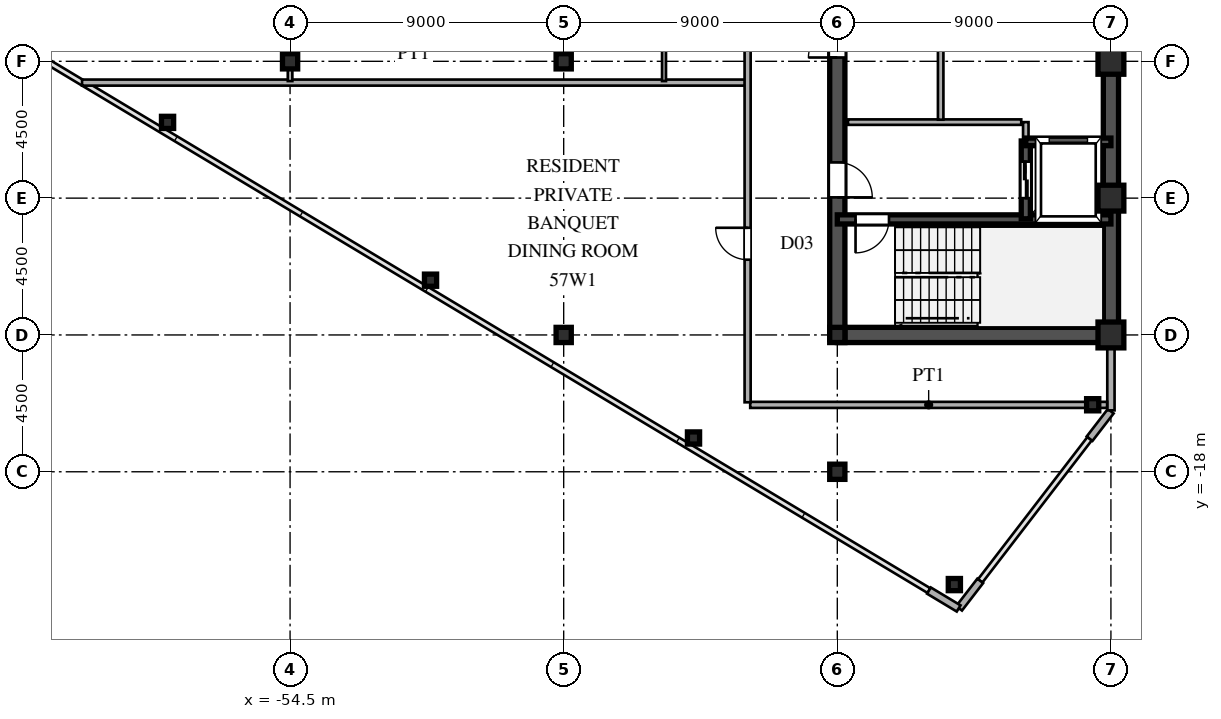
"""IFC4 building model, lengths in metres.
Left out: names, types, materials, properties, quantities, classifications, styles, units other than length and angle.
Written with IfcOpenShell. Run it as: python <this file> out.ifc"""

import sys

from ifc_helpers import new_model, si_unit, direction, frame, frame_2d, origin, origin_2d, place, context, subcontext, project, spatial, rectangle, hollow_rectangle, i_section, extrude, source, transform, mapped, element, fill, save


model = new_model("IFC4")
c1 = context("Model", 3, precision=1e-05, world=origin(), true_north=direction((0.0, 1.0)))
c2 = subcontext(c1, "Body", "Model", "MODEL_VIEW")
j1 = project(units=[si_unit("LENGTHUNIT", "METRE"), si_unit("PLANEANGLEUNIT", "RADIAN")], contexts=[c1])
p1 = place(None, origin())
s1 = spatial("IfcSite", under=j1, at=p1, CompositionType="ELEMENT")
p2 = place(p1, origin())
s2 = spatial("IfcBuilding", under=s1, at=p2, CompositionType="ELEMENT")
p3 = place(p2, frame((0.0, 0.0, 213.9)))
s3 = spatial("IfcBuildingStorey", under=s2, at=p3, CompositionType="ELEMENT", Elevation=213.9)
m1 = source(origin(), c2, "Body", "SweptSolid", [
    extrude(hollow_rectangle(XDim=0.85, YDim=0.85, WallThickness=0.036, at=origin_2d()), origin(), (0.0, 0.0, 1.0), 3.6),
])
for number, where, z_axis, x_axis in (
    (1, (-27.5, -13.5, 0.0), (0.0, 0.0, 1.0), (1.0, 0.0, 0.0)),
    (2, (-27.5, -9.0, 0.0), (0.0, 0.0, 1.0), (1.0, 0.0, 0.0)),
    (3, (-27.5, -4.5, 0.0), (0.0, 0.0, 1.0), (1.0, 0.0, 0.0)),
):
    element("IfcColumn", number, at=place(p3, frame(where, z_axis=z_axis, x_axis=x_axis)), inside=s3, PredefinedType="COLUMN", context=c2, shape_type="MappedRepresentation", body=[
        mapped(m1, transform((0.0, 0.0, 0.0), scale=1.0)),
    ])
m2 = source(origin(), c2, "Body", "SweptSolid", [
    extrude(i_section(OverallWidth=0.5, OverallDepth=0.5, WebThickness=0.02, FlangeThickness=0.032, at=origin_2d()), origin(), (0.0, 0.0, 1.0), 3.6),
])
for number, where, z_axis, x_axis in (
    (4, (-36.5, -18.0, 0.0), (0.0, 0.0, 1.0), (1.0, 0.0, 0.0)),
    (5, (-36.5, -13.5, 0.0), (0.0, 0.0, 1.0), (1.0, 0.0, 0.0)),
    (6, (-45.5, -13.5, 0.0), (0.0, 0.0, 1.0), (1.0, 0.0, 0.0)),
    (7, (-45.5, -4.5, 0.0), (0.0, 0.0, 1.0), (1.0, 0.0, 0.0)),
    (8, (-54.5, -4.5, 0.0), (0.0, 0.0, 1.0), (1.0, 0.0, 0.0)),
):
    element("IfcColumn", number, at=place(p3, frame(where, z_axis=z_axis, x_axis=x_axis)), inside=s3, PredefinedType="COLUMN", context=c2, shape_type="MappedRepresentation", body=[
        mapped(m2, transform((0.0, 0.0, 0.0), scale=1.0)),
    ])
m3 = source(origin(), c2, "Body", "SweptSolid", [
    extrude(hollow_rectangle(XDim=0.4, YDim=0.4, WallThickness=0.016, at=origin_2d()), origin(), (0.0, 0.0, 1.0), 3.6),
])
for number, where, z_axis, x_axis in (
    (9, (-28.1, -15.796, 0.0), (0.0, 0.0, 1.0), (1.0, 0.0, 0.0)),
    (10, (-32.65, -21.71, 0.0), (0.0, 0.0, 1.0), (1.0, 0.0, 0.0)),
    (11, (-41.23, -16.889, 0.0), (0.0, 0.0, 1.0), (1.0, 0.0, 0.0)),
    (12, (-49.88, -11.699, 0.0), (0.0, 0.0, 1.0), (1.0, 0.0, 0.0)),
    (13, (-58.53, -6.509, 0.0), (0.0, 0.0, 1.0), (1.0, 0.0, 0.0)),
):
    element("IfcColumn", number, at=place(p3, frame(where, z_axis=z_axis, x_axis=x_axis)), inside=s3, PredefinedType="COLUMN", context=c2, shape_type="MappedRepresentation", body=[
        mapped(m3, transform((0.0, 0.0, 0.0), scale=1.0)),
    ])
p4 = place(p3, frame((-27.5, -15.98, 0.0), z_axis=(0.0, 0.0, 1.0), x_axis=(0.0, 1.0, 0.0)))
e14 = element("IfcWall", 14, at=p4, inside=s3, PredefinedType="SOLIDWALL", context=c2, shape_type="SweptSolid", body=[
    extrude(rectangle(XDim=1.605, YDim=0.24, at=frame_2d((0.803, 0.0))), origin(), (0.0, 0.0, 1.0), 3.38),
])
p5 = place(p3, frame((-27.5, -14.375, 0.0), z_axis=(0.0, 0.0, 1.0), x_axis=(0.0, 1.0, 0.0)))
e15 = element("IfcWall", 15, at=p5, inside=s3, PredefinedType="SOLIDWALL", context=c2, shape_type="SweptSolid", body=[
    extrude(rectangle(XDim=0.62, YDim=0.24, at=frame_2d((0.31, 0.0))), origin(), (0.0, 0.0, 1.0), 2.88),
])
for number, where, z_axis, x_axis in (
    (16, (-33.486, -21.908, 0.0), (0.0, 0.0, 1.0), (0.857, -0.515, 0.0)),
    (17, (-32.494, -22.492, 0.0), (0.0, 0.0, 1.0), (0.61, 0.793, 0.0)),
    (18, (-28.201, -16.912, 0.0), (0.0, 0.0, 1.0), (0.61, 0.793, 0.0)),
):
    element("IfcWall", number, at=place(p3, frame(where, z_axis=z_axis, x_axis=x_axis)), inside=s3, PredefinedType="SOLIDWALL", context=c2, shape_type="SweptSolid", body=[
        extrude(rectangle(XDim=1.14, YDim=0.24, at=frame_2d((0.57, 0.0))), origin(), (0.0, 0.0, 1.0), 3.38),
    ])
p6 = place(p3, frame((-27.5, -13.5, 0.0), z_axis=(0.0, 0.0, 1.0), x_axis=(0.0, 1.0, 0.0)))
e19 = element("IfcWall", 19, at=p6, inside=s3, PredefinedType="SHEAR", context=c2, shape_type="SweptSolid", body=[
    extrude(rectangle(XDim=12.2, YDim=0.5, at=frame_2d((6.1, 0.0))), origin(), (0.0, 0.0, 1.0), 3.38),
])
p7 = place(p3, frame((-36.5, -13.5, 0.0), z_axis=(0.0, 0.0, 1.0), x_axis=(1.0, 0.0, 0.0)))
e20 = element("IfcWall", 20, at=p7, inside=s3, PredefinedType="SHEAR", context=c2, shape_type="SweptSolid", body=[
    extrude(rectangle(XDim=9.0, YDim=0.5, at=frame_2d((4.5, 0.0))), origin(), (0.0, 0.0, 1.0), 3.38),
])
p8 = place(p3, frame((-36.5, -13.65, 0.0), z_axis=(0.0, 0.0, 1.0), x_axis=(0.0, 1.0, 0.0)))
e21 = element("IfcWall", 21, at=p8, inside=s3, PredefinedType="SHEAR", context=c2, shape_type="SweptSolid", body=[
    extrude(rectangle(XDim=7.15, YDim=0.5, at=frame_2d((3.575, 0.0))), origin(), (0.0, 0.0, 1.0), 3.38),
])
p9 = place(p8, frame((4.675, 0.0, 0.0)))
e22 = element("IfcOpeningElement", 22, at=p9, cuts=e21, PredefinedType="OPENING", context=c2, shape_type="SweptSolid", body=[
    extrude(rectangle(XDim=1.15, YDim=2.2, at=frame_2d((0.575, 1.1))), frame((0.0, 0.26, 0.0), z_axis=(0.0, -1.0, 0.0), x_axis=(1.0, 0.0, 0.0)), (0.0, 0.0, 1.0), 0.52),
])
p10 = place(p3, frame((-36.5, -6.5, 0.0), z_axis=(0.0, 0.0, 1.0), x_axis=(0.0, 1.0, 0.0)))
e23 = element("IfcWall", 23, at=p10, inside=s3, PredefinedType="SHEAR", context=c2, shape_type="SweptSolid", body=[
    extrude(rectangle(XDim=5.2, YDim=0.5, at=frame_2d((2.6, 0.0))), origin(), (0.0, 0.0, 1.0), 3.38),
])
p11 = place(p10, frame((2.125, 0.0, 0.0)))
e24 = element("IfcOpeningElement", 24, at=p11, cuts=e23, PredefinedType="OPENING", context=c2, shape_type="SweptSolid", body=[
    extrude(rectangle(XDim=0.95, YDim=2.15, at=frame_2d((0.475, 1.075))), frame((0.0, 0.26, 0.0), z_axis=(0.0, -1.0, 0.0), x_axis=(1.0, 0.0, 0.0)), (0.0, 0.0, 1.0), 0.52),
])
p12 = place(p3, frame((-36.5, -9.7, 0.0), z_axis=(0.0, 0.0, 1.0), x_axis=(1.0, 0.0, 0.0)))
e25 = element("IfcWall", 25, at=p12, inside=s3, PredefinedType="SHEAR", context=c2, shape_type="SweptSolid", body=[
    extrude(rectangle(XDim=9.0, YDim=0.3, at=frame_2d((4.5, 0.0))), origin(), (0.0, 0.0, 1.0), 3.38),
])
p13 = place(p12, frame((0.6, 0.0, 0.0)))
e26 = element("IfcOpeningElement", 26, at=p13, cuts=e25, PredefinedType="OPENING", context=c2, shape_type="SweptSolid", body=[
    extrude(rectangle(XDim=1.1, YDim=2.2, at=frame_2d((0.55, 1.1))), frame((0.0, 0.16, 0.0), z_axis=(0.0, -1.0, 0.0), x_axis=(1.0, 0.0, 0.0)), (0.0, 0.0, 1.0), 0.32),
])
p14 = place(p3, frame((-30.3, -7.15, 0.0), z_axis=(0.0, 0.0, 1.0), x_axis=(1.0, 0.0, 0.0)))
e27 = element("IfcWall", 27, at=p14, inside=s3, PredefinedType="SHEAR", context=c2, shape_type="SweptSolid", body=[
    extrude(rectangle(XDim=2.8, YDim=0.25, at=frame_2d((1.4, 0.0))), origin(), (0.0, 0.0, 1.0), 3.38),
])
p15 = place(p3, frame((-30.3, -9.68, 0.0), z_axis=(0.0, 0.0, 1.0), x_axis=(0.0, 1.0, 0.0)))
e28 = element("IfcWall", 28, at=p15, inside=s3, PredefinedType="SHEAR", context=c2, shape_type="SweptSolid", body=[
    extrude(rectangle(XDim=2.56, YDim=0.3, at=frame_2d((1.28, 0.0))), origin(), (0.0, 0.0, 1.0), 3.38),
])
p16 = place(p15, frame((0.68, 0.0, 0.0)))
e29 = element("IfcOpeningElement", 29, at=p16, cuts=e28, PredefinedType="OPENING", context=c2, shape_type="SweptSolid", body=[
    extrude(rectangle(XDim=1.2, YDim=2.25, at=frame_2d((0.6, 1.125))), frame((0.0, 0.16, 0.0), z_axis=(0.0, -1.0, 0.0), x_axis=(1.0, 0.0, 0.0)), (0.0, 0.0, 1.0), 0.32),
])
p17 = place(p3, frame((-36.15, -6.5, 0.0), z_axis=(0.0, 0.0, 1.0), x_axis=(1.0, 0.0, 0.0)))
e30 = element("IfcWall", 30, at=p17, inside=s3, PredefinedType="PARTITIONING", context=c2, shape_type="SweptSolid", body=[
    extrude(rectangle(XDim=5.7, YDim=0.18, at=frame_2d((2.85, 0.0))), origin(), (0.0, 0.0, 1.0), 3.38),
])
p18 = place(p3, frame((-30.3, -7.12, 0.0), z_axis=(0.0, 0.0, 1.0), x_axis=(0.0, 1.0, 0.0)))
e31 = element("IfcWall", 31, at=p18, inside=s3, PredefinedType="PARTITIONING", context=c2, shape_type="SweptSolid", body=[
    extrude(rectangle(XDim=0.62, YDim=0.18, at=frame_2d((0.31, 0.0))), origin(), (0.0, 0.0, 1.0), 3.38),
])
p19 = place(p3, frame((-33.1, -6.42, 0.0), z_axis=(0.0, 0.0, 1.0), x_axis=(0.0, 1.0, 0.0)))
e32 = element("IfcWall", 32, at=p19, inside=s3, PredefinedType="PARTITIONING", context=c2, shape_type="SweptSolid", body=[
    extrude(rectangle(XDim=5.04, YDim=0.18, at=frame_2d((2.52, 0.0))), origin(), (0.0, 0.0, 1.0), 3.38),
])
p20 = place(p3, frame((-39.365, -15.8, 0.0), z_axis=(0.0, 0.0, 1.0), x_axis=(1.0, 0.0, 0.0)))
e33 = element("IfcWall", 33, at=p20, inside=s3, PredefinedType="PARTITIONING", context=c2, shape_type="SweptSolid", body=[
    extrude(rectangle(XDim=11.74, YDim=0.2, at=frame_2d((5.87, 0.0))), origin(), (0.0, 0.0, 1.0), 3.38),
])
p21 = place(p3, frame((-61.343, -5.2, 0.0), z_axis=(0.0, 0.0, 1.0), x_axis=(1.0, 0.0, 0.0)))
e34 = element("IfcWall", 34, at=p21, inside=s3, PredefinedType="PARTITIONING", context=c2, shape_type="SweptSolid", body=[
    extrude(rectangle(XDim=21.813, YDim=0.2, at=frame_2d((10.906, 0.0))), origin(), (0.0, 0.0, 1.0), 3.38),
])
p22 = place(p3, frame((-54.5, -5.15, 0.0), z_axis=(0.0, 0.0, 1.0), x_axis=(0.0, 1.0, 0.0)))
e35 = element("IfcWall", 35, at=p22, inside=s3, PredefinedType="PARTITIONING", context=c2, shape_type="SweptSolid", body=[
    extrude(rectangle(XDim=12.7, YDim=0.15, at=frame_2d((6.35, 0.0))), origin(), (0.0, 0.0, 1.0), 2.78),
])
p23 = place(p22, frame((5.875, 0.0, 0.0)))
e36 = element("IfcOpeningElement", 36, at=p23, cuts=e35, PredefinedType="OPENING", context=c2, shape_type="SweptSolid", body=[
    extrude(rectangle(XDim=0.95, YDim=2.15, at=frame_2d((0.475, 1.075))), frame((0.0, 0.085, 0.0), z_axis=(0.0, -1.0, 0.0), x_axis=(1.0, 0.0, 0.0)), (0.0, 0.0, 1.0), 0.17),
])
p24 = place(p3, frame((-42.2, -5.15, 0.0), z_axis=(0.0, 0.0, 1.0), x_axis=(0.0, 1.0, 0.0)))
e37 = element("IfcWall", 37, at=p24, inside=s3, PredefinedType="PARTITIONING", context=c2, shape_type="SweptSolid", body=[
    extrude(rectangle(XDim=3.354, YDim=0.13, at=frame_2d((1.677, 0.0))), origin(), (0.0, 0.0, 1.0), 3.38),
])
p25 = place(p3, frame((-39.45, -15.715, 0.0), z_axis=(0.0, 0.0, 1.0), x_axis=(0.0, 1.0, 0.0)))
e38 = element("IfcWall", 38, at=p25, inside=s3, PredefinedType="PARTITIONING", context=c2, shape_type="SweptSolid", body=[
    extrude(rectangle(XDim=31.43, YDim=0.2, at=frame_2d((15.715, 0.0))), origin(), (0.0, 0.0, 1.0), 3.38),
])
p26 = place(p25, frame((4.69, 0.0, 0.0)))
e39 = element("IfcOpeningElement", 39, at=p26, cuts=e38, PredefinedType="OPENING", context=c2, shape_type="SweptSolid", body=[
    extrude(rectangle(XDim=1.05, YDim=2.25, at=frame_2d((0.525, 1.125))), frame((0.0, 0.11, 0.0), z_axis=(0.0, -1.0, 0.0), x_axis=(1.0, 0.0, 0.0)), (0.0, 0.0, 1.0), 0.22),
])
p27 = place(p25, frame((16.198, 0.0, 0.0)))
e40 = element("IfcOpeningElement", 40, at=p27, cuts=e38, PredefinedType="OPENING", context=c2, shape_type="SweptSolid", body=[
    extrude(rectangle(XDim=1.05, YDim=2.25, at=frame_2d((0.525, 1.125))), frame((0.0, 0.11, 0.0), z_axis=(0.0, -1.0, 0.0), x_axis=(1.0, 0.0, 0.0)), (0.0, 0.0, 1.0), 0.22),
])
p28 = place(p25, frame((24.188, 0.0, 0.0)))
e41 = element("IfcOpeningElement", 41, at=p28, cuts=e38, PredefinedType="OPENING", context=c2, shape_type="SweptSolid", body=[
    extrude(rectangle(XDim=1.05, YDim=2.25, at=frame_2d((0.525, 1.125))), frame((0.0, 0.11, 0.0), z_axis=(0.0, -1.0, 0.0), x_axis=(1.0, 0.0, 0.0)), (0.0, 0.0, 1.0), 0.22),
])
m4 = source(origin(), c2, "Body", "SweptSolid", [
    extrude(rectangle(XDim=1.15, YDim=2.2, at=frame_2d((0.575, 1.1))), frame((0.0, 0.025, 0.0), z_axis=(0.0, -1.0, 0.0), x_axis=(1.0, 0.0, 0.0)), (0.0, 0.0, 1.0), 0.05),
])
p29 = place(p9, frame((1.15, 0.0, 0.0), z_axis=(0.0, 0.0, 1.0), x_axis=(-1.0, 0.0, 0.0)))
e42 = element("IfcDoor", 42, at=p29, inside=s3, OperationType="SINGLE_SWING_LEFT", PredefinedType="DOOR", context=c2, shape_type="MappedRepresentation", body=[
    mapped(m4, transform((0.0, 0.0, 0.0), scale=1.0)),
])
fill(e22, e42)
m5 = source(origin(), c2, "Body", "SweptSolid", [
    extrude(rectangle(XDim=0.95, YDim=2.15, at=frame_2d((0.475, 1.075))), frame((0.0, 0.025, 0.0), z_axis=(0.0, -1.0, 0.0), x_axis=(1.0, 0.0, 0.0)), (0.0, 0.0, 1.0), 0.05),
])
p30 = place(p11, origin())
e43 = element("IfcDoor", 43, at=p30, inside=s3, OperationType="SINGLE_SWING_LEFT", PredefinedType="DOOR", context=c2, shape_type="MappedRepresentation", body=[
    mapped(m5, transform((0.0, 0.0, 0.0), scale=1.0)),
])
fill(e24, e43)
m6 = source(origin(), c2, "Body", "SweptSolid", [
    extrude(rectangle(XDim=1.1, YDim=2.2, at=frame_2d((0.55, 1.1))), frame((0.0, 0.025, 0.0), z_axis=(0.0, -1.0, 0.0), x_axis=(1.0, 0.0, 0.0)), (0.0, 0.0, 1.0), 0.05),
])
p31 = place(p13, frame((1.1, 0.0, 0.0), z_axis=(0.0, 0.0, 1.0), x_axis=(-1.0, 0.0, 0.0)))
e44 = element("IfcDoor", 44, at=p31, inside=s3, OperationType="SINGLE_SWING_LEFT", PredefinedType="DOOR", context=c2, shape_type="MappedRepresentation", body=[
    mapped(m6, transform((0.0, 0.0, 0.0), scale=1.0)),
])
fill(e26, e44)
m7 = source(origin(), c2, "Body", "SweptSolid", [
    extrude(rectangle(XDim=1.2, YDim=2.25, at=frame_2d((0.6, 1.125))), frame((0.0, 0.025, 0.0), z_axis=(0.0, -1.0, 0.0), x_axis=(1.0, 0.0, 0.0)), (0.0, 0.0, 1.0), 0.05),
])
p32 = place(p16, origin())
e45 = element("IfcDoor", 45, at=p32, inside=s3, OperationType="DOUBLE_DOOR_SLIDING", PredefinedType="DOOR", context=c2, shape_type="MappedRepresentation", body=[
    mapped(m7, transform((0.0, 0.0, 0.0), scale=1.0)),
])
fill(e29, e45)
m8 = source(origin(), c2, "Body", "SweptSolid", [
    extrude(rectangle(XDim=1.05, YDim=2.25, at=frame_2d((0.525, 1.125))), frame((0.0, 0.025, 0.0), z_axis=(0.0, -1.0, 0.0), x_axis=(1.0, 0.0, 0.0)), (0.0, 0.0, 1.0), 0.05),
])
p33 = place(p26, origin())
e46 = element("IfcDoor", 46, at=p33, inside=s3, OperationType="SINGLE_SWING_RIGHT", PredefinedType="DOOR", context=c2, shape_type="MappedRepresentation", body=[
    mapped(m8, transform((0.0, 0.0, 0.0), scale=1.0)),
])
fill(e39, e46)
save(model, sys.argv[1])
